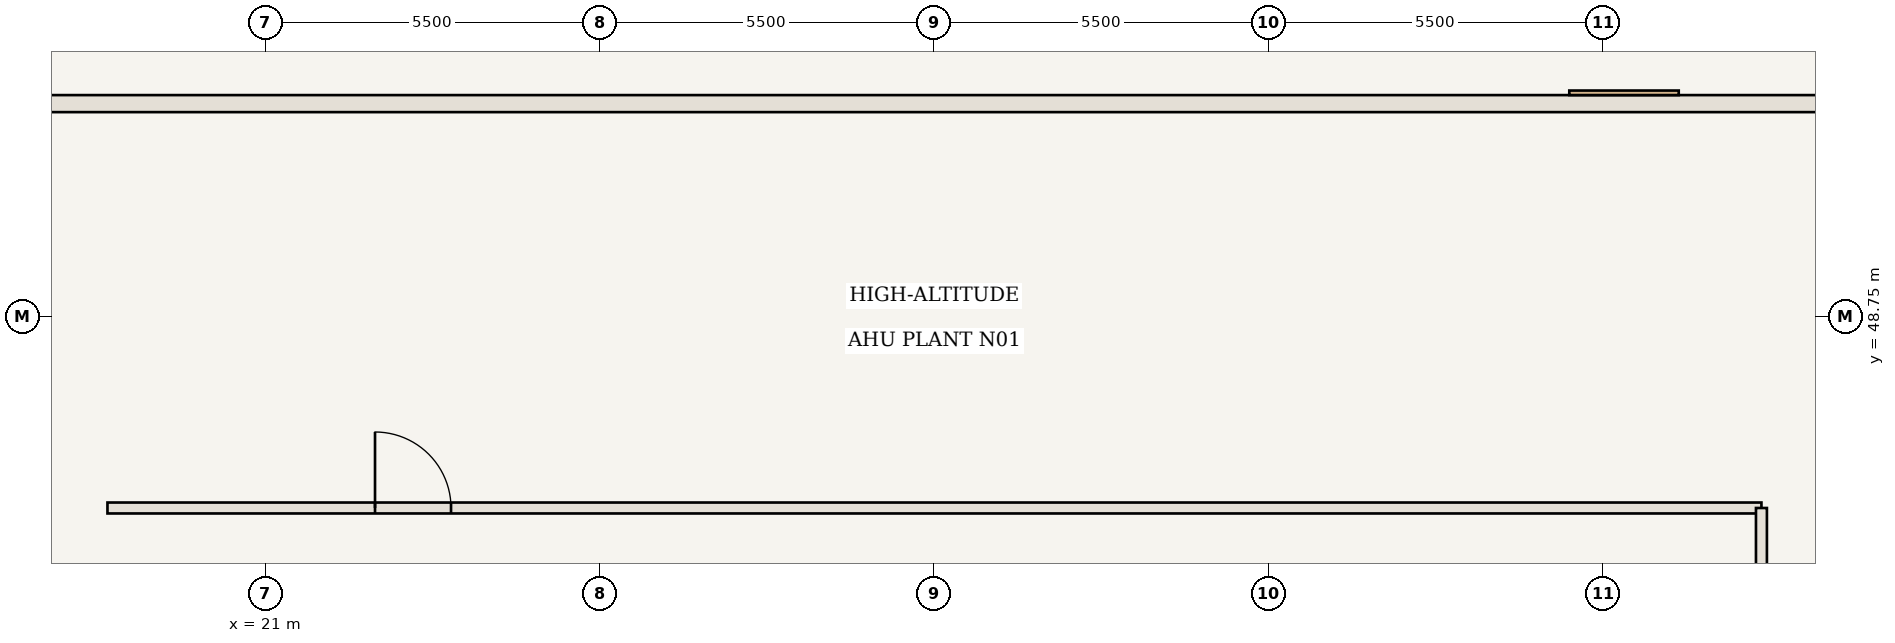
"""IFC4 building model, lengths in metres.
Left out: names, types, materials, properties, quantities, classifications, styles, units other than length and angle.
Written with IfcOpenShell. Run it as: python <this file> out.ifc"""

import sys

from ifc_helpers import new_model, si_unit, direction, frame, frame_2d, origin, place, context, subcontext, project, spatial, rectangle, extrude, element, fill, save


model = new_model("IFC4")
c1 = context("Model", 3, precision=1e-05, world=origin(), true_north=direction((0.0, 1.0)))
c2 = subcontext(c1, "Body", "Model", "MODEL_VIEW")
j1 = project(units=[si_unit("LENGTHUNIT", "METRE"), si_unit("PLANEANGLEUNIT", "RADIAN")], contexts=[c1])
p1 = place(None, origin())
s1 = spatial("IfcSite", under=j1, at=p1, CompositionType="ELEMENT")
p2 = place(p1, origin())
s2 = spatial("IfcBuilding", under=s1, at=p2, CompositionType="ELEMENT")
p3 = place(p2, frame((0.0, 0.0, 252.35)))
s3 = spatial("IfcBuildingStorey", under=s2, at=p3, CompositionType="ELEMENT", Elevation=252.35)
p4 = place(p3, frame((18.4, 45.6, 0.0), z_axis=(0.0, 0.0, 1.0), x_axis=(1.0, 0.0, 0.0)))
e1 = element("IfcWall", 1, at=p4, inside=s3, PredefinedType="STANDARD", context=c2, shape_type="SweptSolid", body=[
    extrude(rectangle(XDim=27.2, YDim=0.18, at=frame_2d((13.6, 0.0))), origin(), (0.0, 0.0, 1.0), 4.83),
])
p5 = place(p4, frame((4.4, 0.0, 0.0)))
e2 = element("IfcOpeningElement", 2, at=p5, cuts=e1, PredefinedType="OPENING", context=c2, shape_type="SweptSolid", body=[
    extrude(rectangle(XDim=1.25, YDim=2.2, at=frame_2d((0.625, 1.1))), frame((0.0, 0.1, 0.0), z_axis=(0.0, -1.0, 0.0), x_axis=(1.0, 0.0, 0.0)), (0.0, 0.0, 1.0), 0.2),
])
p6 = place(p3, frame((45.6, 18.4, 0.0), z_axis=(0.0, 0.0, 1.0), x_axis=(0.0, 1.0, 0.0)))
e3 = element("IfcWall", 3, at=p6, inside=s3, PredefinedType="STANDARD", context=c2, shape_type="SweptSolid", body=[
    extrude(rectangle(XDim=27.2, YDim=0.18, at=frame_2d((13.6, 0.0))), origin(), (0.0, 0.0, 1.0), 4.83),
])
p7 = place(p6, frame((14.55, 0.0, 0.0)))
e4 = element("IfcOpeningElement", 4, at=p7, cuts=e3, PredefinedType="OPENING", context=c2, shape_type="SweptSolid", body=[
    extrude(rectangle(XDim=1.25, YDim=2.2, at=frame_2d((0.625, 1.1))), frame((0.0, 0.1, 0.0), z_axis=(0.0, -1.0, 0.0), x_axis=(1.0, 0.0, 0.0)), (0.0, 0.0, 1.0), 0.2),
])
p8 = place(p3, frame((11.75, 52.25, 0.0), z_axis=(0.0, 0.0, 1.0), x_axis=(1.0, 0.0, 0.0)))
e5 = element("IfcWall", 5, at=p8, inside=s3, PredefinedType="USERDEFINED", context=c2, shape_type="SweptSolid", body=[
    extrude(rectangle(XDim=40.5, YDim=0.28, at=frame_2d((20.25, 0.0))), origin(), (0.0, 0.0, 1.0), 2.83),
])
p9 = place(p5, origin())
e6 = element("IfcDoor", 6, at=p9, inside=s3, OperationType="SINGLE_SWING_LEFT", PredefinedType="DOOR", context=c2, shape_type="SweptSolid", body=[
    extrude(rectangle(XDim=1.25, YDim=2.2, at=frame_2d((0.625, 1.1))), frame((0.0, 0.025, 0.0), z_axis=(0.0, -1.0, 0.0), x_axis=(1.0, 0.0, 0.0)), (0.0, 0.0, 1.0), 0.05),
])
fill(e2, e6)
save(model, sys.argv[1])
